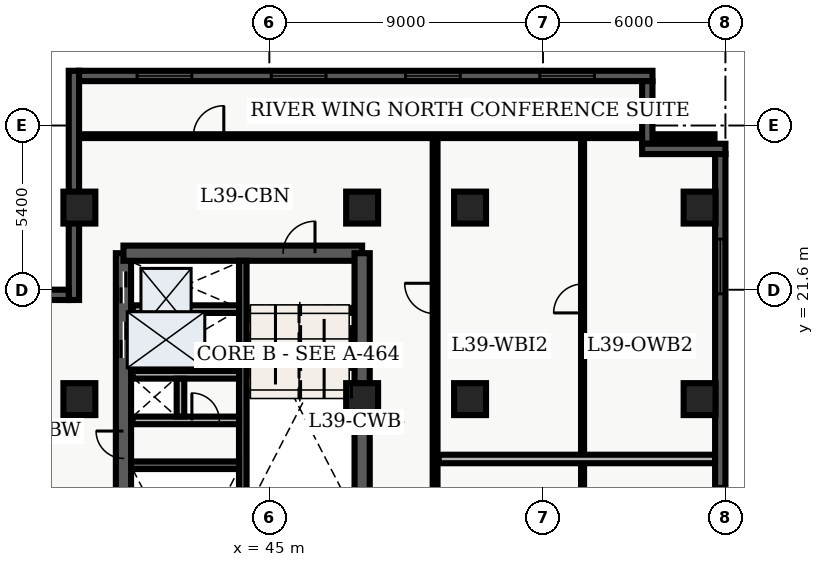
"""IFC4 building model, lengths in metres.
Left out: names, types, materials, properties, quantities, classifications, styles, units other than length and angle.
Written with IfcOpenShell. Run it as: python <this file> out.ifc"""

import sys

from ifc_helpers import new_model, entity, si_unit, converted_unit, direction, frame, origin_with_axes, origin_2d_with_axis, place, context, subcontext, project, spatial, polyline, rectangle, outline, extrude, element, fill, save


model = new_model("IFC4")
c1 = context("Model", 3, precision=1e-05, world=origin_with_axes(), true_north=direction((0.0, 1.0)))
c2 = subcontext(c1, "Body", "Model", "MODEL_VIEW")
j1 = project(units=[si_unit("LENGTHUNIT", "METRE"), converted_unit("PLANEANGLEUNIT", "DEGREE", entity("IfcPlaneAngleMeasure", 0.017), si_unit("PLANEANGLEUNIT", "RADIAN"), dimensions=[0, 0, 0, 0, 0, 0, 0])], contexts=[c1])
p1 = place(None, origin_with_axes())
s1 = spatial("IfcSite", under=j1, at=p1, CompositionType="ELEMENT")
p2 = place(p1, origin_with_axes())
s2 = spatial("IfcBuilding", under=s1, at=p2, CompositionType="ELEMENT")
p3 = place(p2, frame((0.0, 0.0, 160.2), z_axis=(0.0, 0.0, 1.0), x_axis=(1.0, 0.0, 0.0)))
s3 = spatial("IfcBuildingStorey", under=s2, at=p3, CompositionType="ELEMENT", Elevation=160.2)
p4 = place(p3, frame((40.2, 7.2, 0.0), z_axis=(0.0, 0.0, 1.0), x_axis=(0.0, 1.0, 0.0)))
e1 = element("IfcWall", 1, at=p4, inside=s3, PredefinedType="SHEAR", context=c2, shape_type="SweptSolid", body=[
    extrude(outline(polyline([(0.0, -0.25), (15.6, -0.25), (15.6, 0.25), (0.0, 0.25), (0.0, -0.25)])), origin_with_axes(), (0.0, 0.0, 1.0), 3.66),
])
p5 = place(p4, frame((14.475, 0.0, 0.0), z_axis=(0.0, 0.0, 1.0), x_axis=(1.0, 0.0, 0.0)))
e2 = element("IfcOpeningElement", 2, at=p5, cuts=e1, PredefinedType="OPENING", context=c2, shape_type="SweptSolid", body=[
    extrude(rectangle(XDim=1.05, YDim=0.52, at=origin_2d_with_axis()), origin_with_axes(), (0.0, 0.0, 1.0), 2.15),
])
p6 = place(p4, frame((12.75, 0.0, 0.0), z_axis=(0.0, 0.0, 1.0), x_axis=(1.0, 0.0, 0.0)))
e3 = element("IfcOpeningElement", 3, at=p6, cuts=e1, PredefinedType="OPENING", context=c2, shape_type="SweptSolid", body=[
    extrude(rectangle(XDim=1.2, YDim=0.52, at=origin_2d_with_axis()), origin_with_axes(), (0.0, 0.0, 1.0), 2.15),
])
p7 = place(p4, frame((9.3, 0.0, 0.0), z_axis=(0.0, 0.0, 1.0), x_axis=(1.0, 0.0, 0.0)))
e4 = element("IfcOpeningElement", 4, at=p7, cuts=e1, PredefinedType="OPENING", context=c2, shape_type="SweptSolid", body=[
    extrude(rectangle(XDim=0.9, YDim=0.52, at=origin_2d_with_axis()), origin_with_axes(), (0.0, 0.0, 1.0), 2.15),
])
p8 = place(p3, frame((40.2, 22.8, 0.0), z_axis=(0.0, 0.0, 1.0), x_axis=(1.0, 0.0, 0.0)))
e5 = element("IfcWall", 5, at=p8, inside=s3, PredefinedType="SHEAR", context=c2, shape_type="SweptSolid", body=[
    extrude(outline(polyline([(0.0, -0.25), (7.85, -0.25), (7.85, 0.25), (0.0, 0.25), (0.0, -0.25)])), origin_with_axes(), (0.0, 0.0, 1.0), 3.66),
])
p9 = place(p8, frame((5.775, 0.0, 0.0), z_axis=(0.0, 0.0, 1.0), x_axis=(1.0, 0.0, 0.0)))
e6 = element("IfcOpeningElement", 6, at=p9, cuts=e5, PredefinedType="OPENING", context=c2, shape_type="SweptSolid", body=[
    extrude(rectangle(XDim=1.05, YDim=0.52, at=origin_2d_with_axis()), origin_with_axes(), (0.0, 0.0, 1.0), 2.15),
])
p10 = place(p3, frame((48.05, 7.2, 0.0), z_axis=(0.0, 0.0, 1.0), x_axis=(0.0, 1.0, 0.0)))
e7 = element("IfcWall", 7, at=p10, inside=s3, PredefinedType="SHEAR", context=c2, shape_type="SweptSolid", body=[
    extrude(outline(polyline([(0.0, -0.25), (15.6, -0.25), (15.6, 0.25), (0.0, 0.25), (0.0, -0.25)])), origin_with_axes(), (0.0, 0.0, 1.0), 3.66),
])
p11 = place(p10, frame((5.975, 0.0, 0.0), z_axis=(0.0, 0.0, 1.0), x_axis=(1.0, 0.0, 0.0)))
e8 = element("IfcOpeningElement", 8, at=p11, cuts=e7, PredefinedType="OPENING", context=c2, shape_type="SweptSolid", body=[
    extrude(rectangle(XDim=1.05, YDim=0.52, at=origin_2d_with_axis()), origin_with_axes(), (0.0, 0.0, 1.0), 2.15),
])
p12 = place(p10, frame((2.725, 0.0, 0.0), z_axis=(0.0, 0.0, 1.0), x_axis=(1.0, 0.0, 0.0)))
e9 = element("IfcOpeningElement", 9, at=p12, cuts=e7, PredefinedType="OPENING", context=c2, shape_type="SweptSolid", body=[
    extrude(rectangle(XDim=0.95, YDim=0.52, at=origin_2d_with_axis()), origin_with_axes(), (0.0, 0.0, 1.0), 2.15),
])
p13 = place(p3, frame((44.125, 7.45, 0.0), z_axis=(0.0, 0.0, 1.0), x_axis=(0.0, 1.0, 0.0)))
e10 = element("IfcWall", 10, at=p13, inside=s3, PredefinedType="SHEAR", context=c2, shape_type="SweptSolid", body=[
    extrude(outline(polyline([(0.0, -0.125), (15.1, -0.125), (15.1, 0.125), (0.0, 0.125), (0.0, -0.125)])), origin_with_axes(), (0.0, 0.0, 1.0), 3.66),
])
p14 = place(p3, frame((40.45, 15.825, 0.0), z_axis=(0.0, 0.0, 1.0), x_axis=(1.0, 0.0, 0.0)))
e11 = element("IfcWall", 11, at=p14, inside=s3, PredefinedType="SHEAR", context=c2, shape_type="SweptSolid", body=[
    extrude(outline(polyline([(0.0, -0.125), (3.55, -0.125), (3.55, 0.125), (0.0, 0.125), (0.0, -0.125)])), origin_with_axes(), (0.0, 0.0, 1.0), 3.66),
])
p15 = place(p3, frame((40.5, 17.3, 0.0), z_axis=(0.0, 0.0, 1.0), x_axis=(1.0, 0.0, 0.0)))
e12 = element("IfcWall", 12, at=p15, inside=s3, PredefinedType="SOLIDWALL", context=c2, shape_type="SweptSolid", body=[
    extrude(outline(polyline([(0.0, -0.125), (3.5, -0.125), (3.5, 0.125), (0.0, 0.125), (0.0, -0.125)])), origin_with_axes(), (0.0, 0.0, 1.0), 2.7),
])
p16 = place(p15, frame((2.4, 0.0, 0.0), z_axis=(0.0, 0.0, 1.0), x_axis=(1.0, 0.0, 0.0)))
e13 = element("IfcOpeningElement", 13, at=p16, cuts=e12, PredefinedType="OPENING", context=c2, shape_type="SweptSolid", body=[
    extrude(rectangle(XDim=0.9, YDim=0.27, at=origin_2d_with_axis()), origin_with_axes(), (0.0, 0.0, 1.0), 2.15),
])
p17 = place(p3, frame((40.5, 18.8, 0.0), z_axis=(0.0, 0.0, 1.0), x_axis=(1.0, 0.0, 0.0)))
e14 = element("IfcWall", 14, at=p17, inside=s3, PredefinedType="SOLIDWALL", context=c2, shape_type="SweptSolid", body=[
    extrude(outline(polyline([(0.0, -0.125), (3.5, -0.125), (3.5, 0.125), (0.0, 0.125), (0.0, -0.125)])), origin_with_axes(), (0.0, 0.0, 1.0), 2.7),
])
p18 = place(p3, frame((42.075, 17.43, 0.0), z_axis=(0.0, 0.0, 1.0), x_axis=(0.0, 1.0, 0.0)))
e15 = element("IfcWall", 15, at=p18, inside=s3, PredefinedType="SOLIDWALL", context=c2, shape_type="SweptSolid", body=[
    extrude(outline(polyline([(0.0, -0.125), (1.24, -0.125), (1.24, 0.125), (0.0, 0.125), (0.0, -0.125)])), origin_with_axes(), (0.0, 0.0, 1.0), 2.7),
])
for number, where, z_axis, x_axis in (
    (16, (38.75, 18.0, 0.0), (0.0, 0.0, 1.0), (1.0, 0.0, 0.0)),
    (17, (38.75, 24.3, 0.0), (0.0, 0.0, 1.0), (1.0, 0.0, 0.0)),
    (18, (48.05, 18.0, 0.0), (0.0, 0.0, 1.0), (1.0, 0.0, 0.0)),
    (19, (48.05, 24.3, 0.0), (0.0, 0.0, 1.0), (1.0, 0.0, 0.0)),
    (20, (51.6, 18.0, 0.0), (0.0, 0.0, 1.0), (1.0, 0.0, 0.0)),
    (21, (51.6, 24.3, 0.0), (0.0, 0.0, 1.0), (1.0, 0.0, 0.0)),
    (22, (59.15, 18.0, 0.0), (0.0, 0.0, 1.0), (1.0, 0.0, 0.0)),
    (23, (59.15, 24.3, 0.0), (0.0, 0.0, 1.0), (1.0, 0.0, 0.0)),
):
    element("IfcColumn", number, at=place(p3, frame(where, z_axis=z_axis, x_axis=x_axis)), inside=s3, PredefinedType="COLUMN", context=c2, shape_type="SweptSolid", body=[
        extrude(rectangle(XDim=1.05, YDim=1.05, at=origin_2d_with_axis()), origin_with_axes(), (0.0, 0.0, 1.0), 3.9),
    ])
p19 = place(p3, frame((40.5, 20.96, 0.0), z_axis=(0.0, 0.0, 1.0), x_axis=(1.0, 0.0, 0.0)))
e24 = element("IfcWall", 24, at=p19, inside=s3, PredefinedType="SOLIDWALL", context=c2, shape_type="SweptSolid", body=[
    extrude(outline(polyline([(0.0, -0.125), (3.5, -0.125), (3.5, 0.125), (0.0, 0.125), (0.0, -0.125)])), origin_with_axes(), (0.0, 0.0, 1.0), 2.7),
])
p20 = place(p3, frame((50.45, 7.85, 0.0), z_axis=(0.0, 0.0, 1.0), x_axis=(0.0, 1.0, 0.0)))
e25 = element("IfcWall", 25, at=p20, inside=s3, PredefinedType="PARTITIONING", context=c2, shape_type="SweptSolid", body=[
    extrude(outline(polyline([(0.0, -0.08), (18.8, -0.08), (18.8, 0.08), (0.0, 0.08), (0.0, -0.08)])), origin_with_axes(), (0.0, 0.0, 1.0), 2.7),
])
p21 = place(p20, frame((4.12, 0.0, 0.0), z_axis=(0.0, 0.0, 1.0), x_axis=(1.0, 0.0, 0.0)))
e26 = element("IfcOpeningElement", 26, at=p21, cuts=e25, PredefinedType="OPENING", context=c2, shape_type="SweptSolid", body=[
    extrude(rectangle(XDim=1.0, YDim=0.18, at=origin_2d_with_axis()), origin_with_axes(), (0.0, 0.0, 1.0), 2.15),
])
p22 = place(p20, frame((13.46, 0.0, 0.0), z_axis=(0.0, 0.0, 1.0), x_axis=(1.0, 0.0, 0.0)))
e27 = element("IfcOpeningElement", 27, at=p22, cuts=e25, PredefinedType="OPENING", context=c2, shape_type="SweptSolid", body=[
    extrude(rectangle(XDim=1.0, YDim=0.18, at=origin_2d_with_axis()), origin_with_axes(), (0.0, 0.0, 1.0), 2.15),
])
p23 = place(p3, frame((38.735, 26.65, 0.0), z_axis=(0.0, 0.0, 1.0), x_axis=(1.0, 0.0, 0.0)))
e28 = element("IfcWall", 28, at=p23, inside=s3, PredefinedType="PARTITIONING", context=c2, shape_type="SweptSolid", body=[
    extrude(outline(polyline([(0.0, -0.062), (20.905, -0.062), (20.905, 0.062), (0.0, 0.062), (0.0, -0.062)])), origin_with_axes(), (0.0, 0.0, 1.0), 2.7),
])
p24 = place(p23, frame((4.265, 0.0, 0.0), z_axis=(0.0, 0.0, 1.0), x_axis=(1.0, 0.0, 0.0)))
e29 = element("IfcOpeningElement", 29, at=p24, cuts=e28, PredefinedType="OPENING", context=c2, shape_type="SweptSolid", body=[
    extrude(rectangle(XDim=1.0, YDim=0.145, at=origin_2d_with_axis()), origin_with_axes(), (0.0, 0.0, 1.0), 2.15),
])
p25 = place(p3, frame((55.3, 7.98, 0.0), z_axis=(0.0, 0.0, 1.0), x_axis=(0.0, 1.0, 0.0)))
e30 = element("IfcWall", 30, at=p25, inside=s3, PredefinedType="PARTITIONING", context=c2, shape_type="SweptSolid", body=[
    extrude(outline(polyline([(0.0, -0.05), (18.54, -0.05), (18.54, 0.05), (0.0, 0.05), (0.0, -0.05)])), origin_with_axes(), (0.0, 0.0, 1.0), 2.7),
])
p26 = place(p25, frame((3.99, 0.0, 0.0), z_axis=(0.0, 0.0, 1.0), x_axis=(1.0, 0.0, 0.0)))
e31 = element("IfcOpeningElement", 31, at=p26, cuts=e30, PredefinedType="OPENING", context=c2, shape_type="SweptSolid", body=[
    extrude(rectangle(XDim=0.95, YDim=0.12, at=origin_2d_with_axis()), origin_with_axes(), (0.0, 0.0, 1.0), 2.15),
])
p27 = place(p25, frame((13.331, 0.0, 0.0), z_axis=(0.0, 0.0, 1.0), x_axis=(1.0, 0.0, 0.0)))
e32 = element("IfcOpeningElement", 32, at=p27, cuts=e30, PredefinedType="OPENING", context=c2, shape_type="SweptSolid", body=[
    extrude(rectangle(XDim=0.95, YDim=0.12, at=origin_2d_with_axis()), origin_with_axes(), (0.0, 0.0, 1.0), 2.15),
])
p28 = place(p3, frame((50.57, 16.031, 0.0), z_axis=(0.0, 0.0, 1.0), x_axis=(1.0, 0.0, 0.0)))
e33 = element("IfcWall", 33, at=p28, inside=s3, PredefinedType="PARTITIONING", context=c2, shape_type="SweptSolid", body=[
    extrude(outline(polyline([(0.0, -0.14), (9.095, -0.14), (9.095, 0.14), (0.0, 0.14), (0.0, -0.14)])), origin_with_axes(), (0.0, 0.0, 1.0), 2.7),
])
p29 = place(p3, frame((38.57, 21.26, 0.0), z_axis=(0.0, 0.0, 1.0), x_axis=(0.0, 1.0, 0.0)))
e34 = element("IfcWall", 34, at=p29, inside=s3, PredefinedType="SOLIDWALL", context=c2, shape_type="SweptSolid", body=[
    extrude(outline(polyline([(0.0, -0.17), (7.54, -0.17), (7.54, 0.17), (0.0, 0.17), (0.0, -0.17)])), origin_with_axes(), (0.0, 0.0, 1.0), 3.66),
])
p30 = place(p3, frame((38.74, 28.63, 0.0), z_axis=(0.0, 0.0, 1.0), x_axis=(1.0, 0.0, 0.0)))
e35 = element("IfcWall", 35, at=p30, inside=s3, PredefinedType="SOLIDWALL", context=c2, shape_type="SweptSolid", body=[
    extrude(outline(polyline([(0.0, -0.17), (18.86, -0.17), (18.86, 0.17), (0.0, 0.17), (0.0, -0.17)])), origin_with_axes(), (0.0, 0.0, 1.0), 3.66),
])
p31 = place(p30, frame((2.808, 0.0, 0.45), z_axis=(0.0, 0.0, 1.0), x_axis=(1.0, 0.0, 0.0)))
e36 = element("IfcOpeningElement", 36, at=p31, cuts=e35, PredefinedType="OPENING", context=c2, shape_type="SweptSolid", body=[
    extrude(rectangle(XDim=1.8, YDim=0.36, at=origin_2d_with_axis()), origin_with_axes(), (0.0, 0.0, 1.0), 2.1),
])
p32 = place(p30, frame((7.222, 0.0, 0.45), z_axis=(0.0, 0.0, 1.0), x_axis=(1.0, 0.0, 0.0)))
e37 = element("IfcOpeningElement", 37, at=p32, cuts=e35, PredefinedType="OPENING", context=c2, shape_type="SweptSolid", body=[
    extrude(rectangle(XDim=1.8, YDim=0.36, at=origin_2d_with_axis()), origin_with_axes(), (0.0, 0.0, 1.0), 2.1),
])
p33 = place(p30, frame((11.637, 0.0, 0.45), z_axis=(0.0, 0.0, 1.0), x_axis=(1.0, 0.0, 0.0)))
e38 = element("IfcOpeningElement", 38, at=p33, cuts=e35, PredefinedType="OPENING", context=c2, shape_type="SweptSolid", body=[
    extrude(rectangle(XDim=1.8, YDim=0.36, at=origin_2d_with_axis()), origin_with_axes(), (0.0, 0.0, 1.0), 2.1),
])
p34 = place(p30, frame((16.053, 0.0, 0.45), z_axis=(0.0, 0.0, 1.0), x_axis=(1.0, 0.0, 0.0)))
e39 = element("IfcOpeningElement", 39, at=p34, cuts=e35, PredefinedType="OPENING", context=c2, shape_type="SweptSolid", body=[
    extrude(rectangle(XDim=1.8, YDim=0.36, at=origin_2d_with_axis()), origin_with_axes(), (0.0, 0.0, 1.0), 2.1),
])
p35 = place(p3, frame((57.43, 28.46, 0.0), z_axis=(0.0, 0.0, 1.0), x_axis=(0.0, -1.0, 0.0)))
e40 = element("IfcWall", 40, at=p35, inside=s3, PredefinedType="SOLIDWALL", context=c2, shape_type="SweptSolid", body=[
    extrude(outline(polyline([(0.0, -0.17), (2.06, -0.17), (2.06, 0.17), (0.0, 0.17), (0.0, -0.17)])), origin_with_axes(), (0.0, 0.0, 1.0), 3.66),
])
p36 = place(p3, frame((57.26, 26.23, 0.0), z_axis=(0.0, 0.0, 1.0), x_axis=(1.0, 0.0, 0.0)))
e41 = element("IfcWall", 41, at=p36, inside=s3, PredefinedType="SOLIDWALL", context=c2, shape_type="SweptSolid", body=[
    extrude(outline(polyline([(0.0, -0.17), (2.74, -0.17), (2.74, 0.17), (0.0, 0.17), (0.0, -0.17)])), origin_with_axes(), (0.0, 0.0, 1.0), 3.66),
])
p37 = place(p3, frame((59.83, 26.06, 0.0), z_axis=(0.0, 0.0, 1.0), x_axis=(0.0, -1.0, 0.0)))
e42 = element("IfcWall", 42, at=p37, inside=s3, PredefinedType="SOLIDWALL", context=c2, shape_type="SweptSolid", body=[
    extrude(outline(polyline([(0.0, -0.17), (23.66, -0.17), (23.66, 0.17), (0.0, 0.17), (0.0, -0.17)])), origin_with_axes(), (0.0, 0.0, 1.0), 3.66),
])
p38 = place(p37, frame((3.696, 0.0, 0.45), z_axis=(0.0, 0.0, 1.0), x_axis=(1.0, 0.0, 0.0)))
e43 = element("IfcOpeningElement", 43, at=p38, cuts=e42, PredefinedType="OPENING", context=c2, shape_type="SweptSolid", body=[
    extrude(rectangle(XDim=1.8, YDim=0.36, at=origin_2d_with_axis()), origin_with_axes(), (0.0, 0.0, 1.0), 2.1),
])
p39 = place(p37, frame((11.83, 0.0, 0.45), z_axis=(0.0, 0.0, 1.0), x_axis=(1.0, 0.0, 0.0)))
e44 = element("IfcOpeningElement", 44, at=p39, cuts=e42, PredefinedType="OPENING", context=c2, shape_type="SweptSolid", body=[
    extrude(rectangle(XDim=1.8, YDim=0.36, at=origin_2d_with_axis()), origin_with_axes(), (0.0, 0.0, 1.0), 2.1),
])
p40 = place(p37, frame((20.364, 0.0, 0.45), z_axis=(0.0, 0.0, 1.0), x_axis=(1.0, 0.0, 0.0)))
e45 = element("IfcOpeningElement", 45, at=p40, cuts=e42, PredefinedType="OPENING", context=c2, shape_type="SweptSolid", body=[
    extrude(rectangle(XDim=1.8, YDim=0.36, at=origin_2d_with_axis()), origin_with_axes(), (0.0, 0.0, 1.0), 2.1),
])
p41 = place(p3, frame((23.076, 21.43, 0.0), z_axis=(0.0, 0.0, 1.0), x_axis=(1.0, 0.0, 0.0)))
e46 = element("IfcWall", 46, at=p41, inside=s3, PredefinedType="SOLIDWALL", context=c2, shape_type="SweptSolid", body=[
    extrude(outline(polyline([(0.0, -0.17), (15.324, -0.17), (15.324, 0.17), (0.0, 0.17), (0.0, -0.17)])), origin_with_axes(), (0.0, 0.0, 1.0), 3.66),
])
p42 = place(p41, frame((7.662, 0.0, 0.45), z_axis=(0.0, 0.0, 1.0), x_axis=(1.0, 0.0, 0.0)))
e47 = element("IfcOpeningElement", 47, at=p42, cuts=e46, PredefinedType="OPENING", context=c2, shape_type="SweptSolid", body=[
    extrude(rectangle(XDim=1.8, YDim=0.36, at=origin_2d_with_axis()), origin_with_axes(), (0.0, 0.0, 1.0), 2.1),
])
p43 = place(p4, frame((14.475, 0.0, 0.0), z_axis=(0.0, 0.0, 1.0), x_axis=(1.0, 0.0, 0.0)))
e48 = element("IfcDoor", 48, at=p43, inside=s3, OperationType="SLIDING_TO_RIGHT", PredefinedType="DOOR", context=c2, shape_type="SweptSolid", body=[
    extrude(rectangle(XDim=1.05, YDim=0.09, at=origin_2d_with_axis()), origin_with_axes(), (0.0, 0.0, 1.0), 2.15),
])
fill(e2, e48)
p44 = place(p4, frame((12.75, 0.0, 0.0), z_axis=(0.0, 0.0, 1.0), x_axis=(1.0, 0.0, 0.0)))
e49 = element("IfcDoor", 49, at=p44, inside=s3, OperationType="DOUBLE_DOOR_SLIDING", PredefinedType="DOOR", context=c2, shape_type="SweptSolid", body=[
    extrude(rectangle(XDim=1.2, YDim=0.09, at=origin_2d_with_axis()), origin_with_axes(), (0.0, 0.0, 1.0), 2.15),
])
fill(e3, e49)
p45 = place(p4, frame((9.3, 0.0, 0.0), z_axis=(0.0, 0.0, 1.0), x_axis=(1.0, 0.0, 0.0)))
e50 = element("IfcDoor", 50, at=p45, inside=s3, OperationType="SINGLE_SWING_RIGHT", PredefinedType="DOOR", context=c2, shape_type="SweptSolid", body=[
    extrude(rectangle(XDim=0.9, YDim=0.09, at=origin_2d_with_axis()), origin_with_axes(), (0.0, 0.0, 1.0), 2.15),
])
fill(e4, e50)
p46 = place(p15, frame((2.4, 0.0, 0.0), z_axis=(0.0, 0.0, 1.0), x_axis=(1.0, 0.0, 0.0)))
e51 = element("IfcDoor", 51, at=p46, inside=s3, OperationType="SINGLE_SWING_LEFT", PredefinedType="DOOR", context=c2, shape_type="SweptSolid", body=[
    extrude(rectangle(XDim=0.9, YDim=0.09, at=origin_2d_with_axis()), origin_with_axes(), (0.0, 0.0, 1.0), 2.15),
])
fill(e13, e51)
p47 = place(p8, frame((5.775, 0.0, 0.0), z_axis=(0.0, 0.0, 1.0), x_axis=(1.0, 0.0, 0.0)))
e52 = element("IfcDoor", 52, at=p47, inside=s3, OperationType="SINGLE_SWING_RIGHT", PredefinedType="DOOR", context=c2, shape_type="SweptSolid", body=[
    extrude(rectangle(XDim=1.05, YDim=0.09, at=origin_2d_with_axis()), origin_with_axes(), (0.0, 0.0, 1.0), 2.15),
])
fill(e6, e52)
p48 = place(p23, frame((4.265, 0.0, 0.0), z_axis=(0.0, 0.0, 1.0), x_axis=(1.0, 0.0, 0.0)))
e53 = element("IfcDoor", 53, at=p48, inside=s3, OperationType="SINGLE_SWING_RIGHT", PredefinedType="DOOR", context=c2, shape_type="SweptSolid", body=[
    extrude(rectangle(XDim=1.0, YDim=0.075, at=origin_2d_with_axis()), origin_with_axes(), (0.0, 0.0, 1.0), 2.15),
])
fill(e29, e53)
p49 = place(p25, frame((13.331, 0.0, 0.0), z_axis=(0.0, 0.0, 1.0), x_axis=(1.0, 0.0, 0.0)))
e54 = element("IfcDoor", 54, at=p49, inside=s3, OperationType="SINGLE_SWING_LEFT", PredefinedType="DOOR", context=c2, shape_type="SweptSolid", body=[
    extrude(rectangle(XDim=0.95, YDim=0.06, at=origin_2d_with_axis()), origin_with_axes(), (0.0, 0.0, 1.0), 2.15),
])
fill(e32, e54)
p50 = place(p20, frame((13.46, 0.0, 0.0), z_axis=(0.0, 0.0, 1.0), x_axis=(1.0, 0.0, 0.0)))
e55 = element("IfcDoor", 55, at=p50, inside=s3, OperationType="SINGLE_SWING_RIGHT", PredefinedType="DOOR", context=c2, shape_type="SweptSolid", body=[
    extrude(rectangle(XDim=1.0, YDim=0.09, at=origin_2d_with_axis()), origin_with_axes(), (0.0, 0.0, 1.0), 2.15),
])
fill(e27, e55)
p51 = place(p30, frame((2.808, 0.0, 0.45), z_axis=(0.0, 0.0, 1.0), x_axis=(1.0, 0.0, 0.0)))
e56 = element("IfcWindow", 56, at=p51, inside=s3, PredefinedType="WINDOW", context=c2, shape_type="SweptSolid", body=[
    extrude(rectangle(XDim=1.8, YDim=0.09, at=origin_2d_with_axis()), origin_with_axes(), (0.0, 0.0, 1.0), 2.1),
])
fill(e36, e56)
p52 = place(p30, frame((7.222, 0.0, 0.45), z_axis=(0.0, 0.0, 1.0), x_axis=(1.0, 0.0, 0.0)))
e57 = element("IfcWindow", 57, at=p52, inside=s3, PredefinedType="WINDOW", context=c2, shape_type="SweptSolid", body=[
    extrude(rectangle(XDim=1.8, YDim=0.09, at=origin_2d_with_axis()), origin_with_axes(), (0.0, 0.0, 1.0), 2.1),
])
fill(e37, e57)
p53 = place(p30, frame((11.637, 0.0, 0.45), z_axis=(0.0, 0.0, 1.0), x_axis=(1.0, 0.0, 0.0)))
e58 = element("IfcWindow", 58, at=p53, inside=s3, PredefinedType="WINDOW", context=c2, shape_type="SweptSolid", body=[
    extrude(rectangle(XDim=1.8, YDim=0.09, at=origin_2d_with_axis()), origin_with_axes(), (0.0, 0.0, 1.0), 2.1),
])
fill(e38, e58)
p54 = place(p30, frame((16.053, 0.0, 0.45), z_axis=(0.0, 0.0, 1.0), x_axis=(1.0, 0.0, 0.0)))
e59 = element("IfcWindow", 59, at=p54, inside=s3, PredefinedType="WINDOW", context=c2, shape_type="SweptSolid", body=[
    extrude(rectangle(XDim=1.8, YDim=0.09, at=origin_2d_with_axis()), origin_with_axes(), (0.0, 0.0, 1.0), 2.1),
])
fill(e39, e59)
p55 = place(p37, frame((3.696, 0.0, 0.45), z_axis=(0.0, 0.0, 1.0), x_axis=(1.0, 0.0, 0.0)))
e60 = element("IfcWindow", 60, at=p55, inside=s3, PredefinedType="WINDOW", context=c2, shape_type="SweptSolid", body=[
    extrude(rectangle(XDim=1.8, YDim=0.09, at=origin_2d_with_axis()), origin_with_axes(), (0.0, 0.0, 1.0), 2.1),
])
fill(e43, e60)
p56 = place(p37, frame((11.83, 0.0, 0.45), z_axis=(0.0, 0.0, 1.0), x_axis=(1.0, 0.0, 0.0)))
e61 = element("IfcWindow", 61, at=p56, inside=s3, PredefinedType="WINDOW", context=c2, shape_type="SweptSolid", body=[
    extrude(rectangle(XDim=1.8, YDim=0.09, at=origin_2d_with_axis()), origin_with_axes(), (0.0, 0.0, 1.0), 2.1),
])
fill(e44, e61)
save(model, sys.argv[1])
